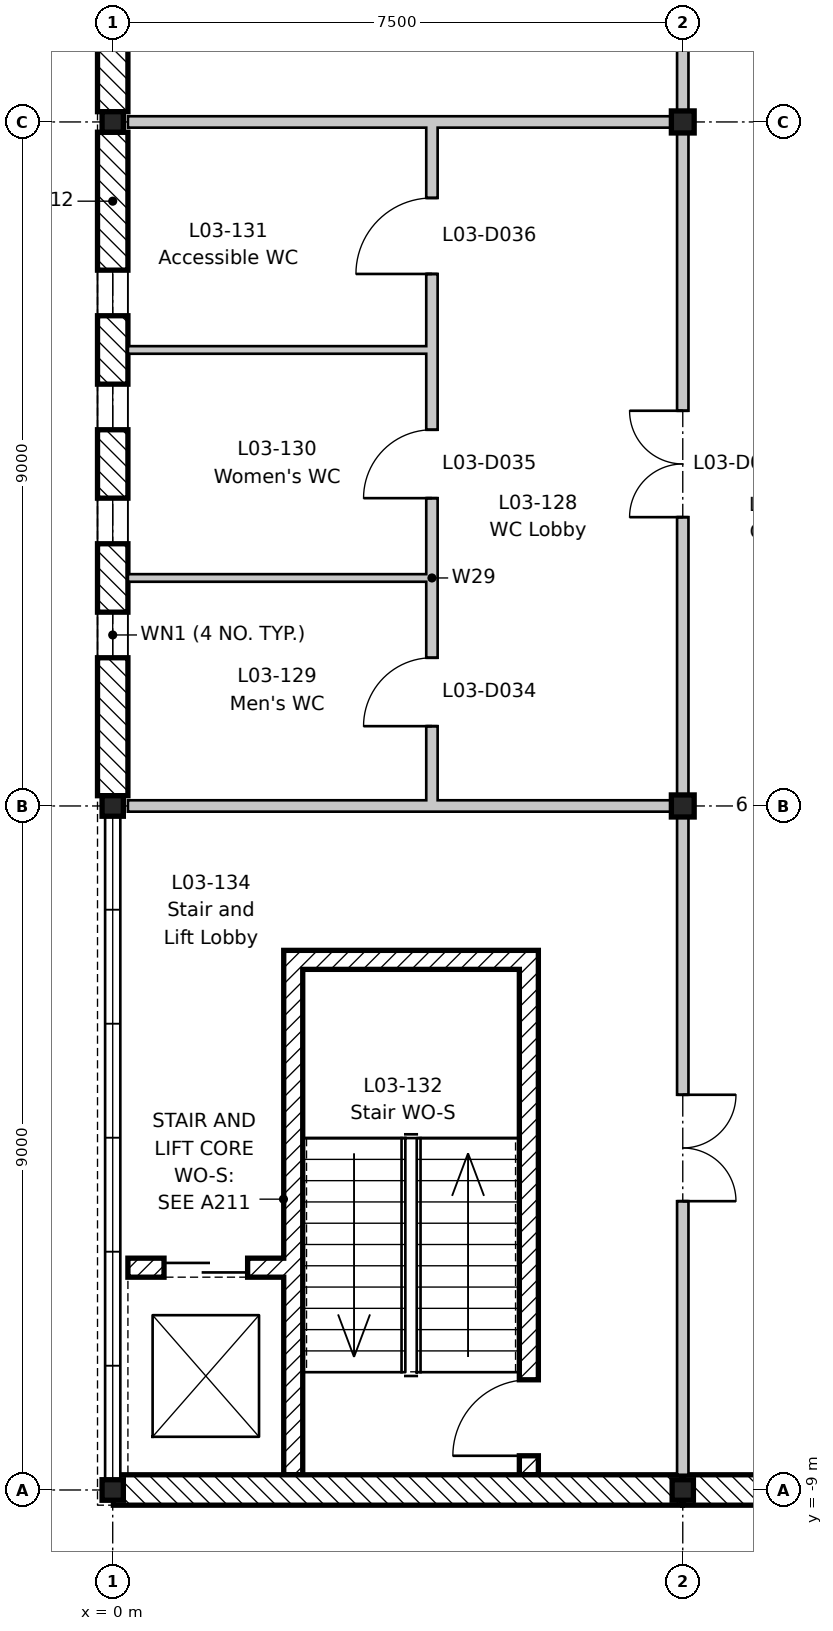
"""IFC4 building model, lengths in metres.
Left out: names, types, materials, properties, quantities, classifications, styles, units other than length and angle.
Written with IfcOpenShell. Run it as: python <this file> out.ifc"""

import sys

from ifc_helpers import new_model, si_unit, direction, frame, frame_2d, origin, origin_2d, place, context, subcontext, project, spatial, rectangle, i_section, extrude, element, fill, save


model = new_model("IFC4")
c1 = context("Model", 3, precision=1e-05, world=origin(), true_north=direction((0.0, 1.0)))
c2 = subcontext(c1, "Body", "Model", "MODEL_VIEW")
j1 = project(units=[si_unit("LENGTHUNIT", "METRE"), si_unit("PLANEANGLEUNIT", "RADIAN")], contexts=[c1])
p1 = place(None, origin())
s1 = spatial("IfcSite", under=j1, at=p1, CompositionType="ELEMENT")
p2 = place(p1, origin())
s2 = spatial("IfcBuilding", under=s1, at=p2, CompositionType="ELEMENT")
p3 = place(p2, frame((0.0, 0.0, 14.4)))
s3 = spatial("IfcBuildingStorey", under=s2, at=p3, CompositionType="ELEMENT", Elevation=14.4)
for number, where, z_axis, x_axis in (
    (1, (0.0, -9.0, -0.2), (0.0, 0.0, 1.0), (1.0, 0.0, 0.0)),
    (2, (0.0, 0.0, -0.2), (0.0, 0.0, 1.0), (1.0, 0.0, 0.0)),
    (3, (0.0, 9.0, -0.2), (0.0, 0.0, 1.0), (1.0, 0.0, 0.0)),
    (4, (7.5, -9.0, -0.2), (0.0, 0.0, 1.0), (1.0, 0.0, 0.0)),
):
    element("IfcColumn", number, at=place(p3, frame(where, z_axis=z_axis, x_axis=x_axis)), inside=s3, PredefinedType="COLUMN", context=c2, shape_type="SweptSolid", body=[
        extrude(i_section(OverallWidth=0.28, OverallDepth=0.27, WebThickness=0.008, FlangeThickness=0.013, FilletRadius=0.024, at=origin_2d()), origin(), (0.0, 0.0, 1.0), 4.2),
    ])
for number, where, z_axis, x_axis in (
    (5, (7.5, 0.0, -0.2), (0.0, 0.0, 1.0), (1.0, 0.0, 0.0)),
    (6, (7.5, 9.0, -0.2), (0.0, 0.0, 1.0), (1.0, 0.0, 0.0)),
):
    element("IfcColumn", number, at=place(p3, frame(where, z_axis=z_axis, x_axis=x_axis)), inside=s3, PredefinedType="COLUMN", context=c2, shape_type="SweptSolid", body=[
        extrude(i_section(OverallWidth=0.3, OverallDepth=0.29, WebThickness=0.009, FlangeThickness=0.014, FilletRadius=0.027, at=origin_2d()), origin(), (0.0, 0.0, 1.0), 4.2),
    ])
p4 = place(p3, frame((2.375, -8.8, 0.0), z_axis=(0.0, 0.0, 1.0), x_axis=(0.0, 1.0, 0.0)))
e7 = element("IfcWall", 7, at=p4, inside=s3, PredefinedType="SHEAR", context=c2, shape_type="SweptSolid", body=[
    extrude(rectangle(XDim=6.9, YDim=0.25, at=frame_2d((3.45, 0.0))), origin(), (0.0, 0.0, 1.0), 4.0),
])
p5 = place(p3, frame((5.475, -8.8, 0.0), z_axis=(0.0, 0.0, 1.0), x_axis=(0.0, 1.0, 0.0)))
e8 = element("IfcWall", 8, at=p5, inside=s3, PredefinedType="SHEAR", context=c2, shape_type="SweptSolid", body=[
    extrude(rectangle(XDim=6.9, YDim=0.25, at=frame_2d((3.45, 0.0))), origin(), (0.0, 0.0, 1.0), 4.0),
])
p6 = place(p5, frame((0.25, 0.0, 0.0)))
e9 = element("IfcOpeningElement", 9, at=p6, cuts=e8, PredefinedType="OPENING", context=c2, shape_type="SweptSolid", body=[
    extrude(rectangle(XDim=1.0, YDim=2.1, at=frame_2d((0.5, 1.05))), frame((0.0, 0.135, 0.0), z_axis=(0.0, -1.0, 0.0), x_axis=(1.0, 0.0, 0.0)), (0.0, 0.0, 1.0), 0.27),
])
p7 = place(p3, frame((2.5, -2.025, 0.0), z_axis=(0.0, 0.0, 1.0), x_axis=(1.0, 0.0, 0.0)))
e10 = element("IfcWall", 10, at=p7, inside=s3, PredefinedType="SHEAR", context=c2, shape_type="SweptSolid", body=[
    extrude(rectangle(XDim=2.85, YDim=0.25, at=frame_2d((1.425, 0.0))), origin(), (0.0, 0.0, 1.0), 4.0),
])
p8 = place(p3, frame((0.2, -6.075, 0.0), z_axis=(0.0, 0.0, 1.0), x_axis=(1.0, 0.0, 0.0)))
e11 = element("IfcWall", 11, at=p8, inside=s3, PredefinedType="SHEAR", context=c2, shape_type="SweptSolid", body=[
    extrude(rectangle(XDim=2.05, YDim=0.25, at=frame_2d((1.025, 0.0))), origin(), (0.0, 0.0, 1.0), 4.0),
])
p9 = place(p8, frame((0.475, 0.0, 0.0)))
e12 = element("IfcOpeningElement", 12, at=p9, cuts=e11, PredefinedType="OPENING", context=c2, shape_type="SweptSolid", body=[
    extrude(rectangle(XDim=1.1, YDim=2.1, at=frame_2d((0.55, 1.05))), frame((0.0, 0.135, 0.0), z_axis=(0.0, -1.0, 0.0), x_axis=(1.0, 0.0, 0.0)), (0.0, 0.0, 1.0), 0.27),
])
p10 = place(p3, frame((0.0, 0.135, 0.0), z_axis=(0.0, 0.0, 1.0), x_axis=(0.0, 1.0, 0.0)))
e13 = element("IfcWall", 13, at=p10, inside=s3, PredefinedType="STANDARD", context=c2, shape_type="SweptSolid", body=[
    extrude(rectangle(XDim=8.73, YDim=0.4, at=frame_2d((4.365, 0.0))), origin(), (0.0, 0.0, 1.0), 3.6),
])
p11 = place(p10, frame((1.815, 0.0, 1.5)))
e14 = element("IfcOpeningElement", 14, at=p11, cuts=e13, PredefinedType="OPENING", context=c2, shape_type="SweptSolid", body=[
    extrude(rectangle(XDim=0.6, YDim=1.2, at=frame_2d((0.3, 0.6))), frame((0.0, 0.21, 0.0), z_axis=(0.0, -1.0, 0.0), x_axis=(1.0, 0.0, 0.0)), (0.0, 0.0, 1.0), 0.42),
])
p12 = place(p10, frame((3.315, 0.0, 1.5)))
e15 = element("IfcOpeningElement", 15, at=p12, cuts=e13, PredefinedType="OPENING", context=c2, shape_type="SweptSolid", body=[
    extrude(rectangle(XDim=0.6, YDim=1.2, at=frame_2d((0.3, 0.6))), frame((0.0, 0.21, 0.0), z_axis=(0.0, -1.0, 0.0), x_axis=(1.0, 0.0, 0.0)), (0.0, 0.0, 1.0), 0.42),
])
p13 = place(p10, frame((4.815, 0.0, 1.5)))
e16 = element("IfcOpeningElement", 16, at=p13, cuts=e13, PredefinedType="OPENING", context=c2, shape_type="SweptSolid", body=[
    extrude(rectangle(XDim=0.6, YDim=1.2, at=frame_2d((0.3, 0.6))), frame((0.0, 0.21, 0.0), z_axis=(0.0, -1.0, 0.0), x_axis=(1.0, 0.0, 0.0)), (0.0, 0.0, 1.0), 0.42),
])
p14 = place(p10, frame((6.315, 0.0, 1.5)))
e17 = element("IfcOpeningElement", 17, at=p14, cuts=e13, PredefinedType="OPENING", context=c2, shape_type="SweptSolid", body=[
    extrude(rectangle(XDim=0.6, YDim=1.2, at=frame_2d((0.3, 0.6))), frame((0.0, 0.21, 0.0), z_axis=(0.0, -1.0, 0.0), x_axis=(1.0, 0.0, 0.0)), (0.0, 0.0, 1.0), 0.42),
])
p15 = place(p3, frame((0.0, 9.135, 0.0), z_axis=(0.0, 0.0, 1.0), x_axis=(0.0, 1.0, 0.0)))
e18 = element("IfcWall", 18, at=p15, inside=s3, PredefinedType="STANDARD", context=c2, shape_type="SweptSolid", body=[
    extrude(rectangle(XDim=8.73, YDim=0.4, at=frame_2d((4.365, 0.0))), origin(), (0.0, 0.0, 1.0), 3.6),
])
p16 = place(p15, frame((1.515, 0.0, 0.6)))
e19 = element("IfcOpeningElement", 19, at=p16, cuts=e18, PredefinedType="OPENING", context=c2, shape_type="SweptSolid", body=[
    extrude(rectangle(XDim=1.2, YDim=2.7, at=frame_2d((0.6, 1.35))), frame((0.0, 0.21, 0.0), z_axis=(0.0, -1.0, 0.0), x_axis=(1.0, 0.0, 0.0)), (0.0, 0.0, 1.0), 0.42),
])
p17 = place(p15, frame((3.015, 0.0, 0.6)))
e20 = element("IfcOpeningElement", 20, at=p17, cuts=e18, PredefinedType="OPENING", context=c2, shape_type="SweptSolid", body=[
    extrude(rectangle(XDim=1.2, YDim=2.7, at=frame_2d((0.6, 1.35))), frame((0.0, 0.21, 0.0), z_axis=(0.0, -1.0, 0.0), x_axis=(1.0, 0.0, 0.0)), (0.0, 0.0, 1.0), 0.42),
])
p18 = place(p15, frame((4.515, 0.0, 0.6)))
e21 = element("IfcOpeningElement", 21, at=p18, cuts=e18, PredefinedType="OPENING", context=c2, shape_type="SweptSolid", body=[
    extrude(rectangle(XDim=1.2, YDim=2.7, at=frame_2d((0.6, 1.35))), frame((0.0, 0.21, 0.0), z_axis=(0.0, -1.0, 0.0), x_axis=(1.0, 0.0, 0.0)), (0.0, 0.0, 1.0), 0.42),
])
p19 = place(p15, frame((6.015, 0.0, 0.6)))
e22 = element("IfcOpeningElement", 22, at=p19, cuts=e18, PredefinedType="OPENING", context=c2, shape_type="SweptSolid", body=[
    extrude(rectangle(XDim=1.2, YDim=2.7, at=frame_2d((0.6, 1.35))), frame((0.0, 0.21, 0.0), z_axis=(0.0, -1.0, 0.0), x_axis=(1.0, 0.0, 0.0)), (0.0, 0.0, 1.0), 0.42),
])
p20 = place(p3, frame((7.491, -9.0, 0.0), z_axis=(0.0, 0.0, 1.0), x_axis=(-1.0, 0.0, 0.0)))
e23 = element("IfcWall", 23, at=p20, inside=s3, PredefinedType="STANDARD", context=c2, shape_type="SweptSolid", body=[
    extrude(rectangle(XDim=7.482, YDim=0.4, at=frame_2d((3.741, 0.0))), origin(), (0.0, 0.0, 1.0), 3.67),
])
p21 = place(p3, frame((10.491, -9.0, 0.0), z_axis=(0.0, 0.0, 1.0), x_axis=(-1.0, 0.0, 0.0)))
e24 = element("IfcWall", 24, at=p21, inside=s3, PredefinedType="STANDARD", context=c2, shape_type="SweptSolid", body=[
    extrude(rectangle(XDim=2.982, YDim=0.4, at=frame_2d((1.491, 0.0))), origin(), (0.0, 0.0, 1.0), 3.8),
])
for number, where, z_axis, x_axis in (
    (25, (0.2, 9.0, 0.0), (0.0, 0.0, 1.0), (1.0, 0.0, 0.0)),
    (26, (0.2, 0.0, 0.0), (0.0, 0.0, 1.0), (1.0, 0.0, 0.0)),
):
    element("IfcWall", number, at=place(p3, frame(where, z_axis=z_axis, x_axis=x_axis)), inside=s3, PredefinedType="PARTITIONING", context=c2, shape_type="SweptSolid", body=[
        extrude(rectangle(XDim=7.225, YDim=0.15, at=frame_2d((3.613, 0.0))), origin(), (0.0, 0.0, 1.0), 3.65),
    ])
p22 = place(p3, frame((7.5, -8.8, 0.0), z_axis=(0.0, 0.0, 1.0), x_axis=(0.0, 1.0, 0.0)))
e27 = element("IfcWall", 27, at=p22, inside=s3, PredefinedType="PARTITIONING", context=c2, shape_type="SweptSolid", body=[
    extrude(rectangle(XDim=79.3, YDim=0.15, at=frame_2d((39.65, 0.0))), origin(), (0.0, 0.0, 1.0), 3.48),
])
p23 = place(p22, frame((18.8, 0.0, 0.0)))
e28 = element("IfcOpeningElement", 28, at=p23, cuts=e27, PredefinedType="OPENING", context=c2, shape_type="SweptSolid", body=[
    extrude(rectangle(XDim=1.0, YDim=2.1, at=frame_2d((0.5, 1.05))), frame((0.0, 0.085, 0.0), z_axis=(0.0, -1.0, 0.0), x_axis=(1.0, 0.0, 0.0)), (0.0, 0.0, 1.0), 0.17),
])
p24 = place(p22, frame((23.3, 0.0, 0.0)))
e29 = element("IfcOpeningElement", 29, at=p24, cuts=e27, PredefinedType="OPENING", context=c2, shape_type="SweptSolid", body=[
    extrude(rectangle(XDim=1.0, YDim=2.1, at=frame_2d((0.5, 1.05))), frame((0.0, 0.085, 0.0), z_axis=(0.0, -1.0, 0.0), x_axis=(1.0, 0.0, 0.0)), (0.0, 0.0, 1.0), 0.17),
])
p25 = place(p22, frame((27.8, 0.0, 0.0)))
e30 = element("IfcOpeningElement", 30, at=p25, cuts=e27, PredefinedType="OPENING", context=c2, shape_type="SweptSolid", body=[
    extrude(rectangle(XDim=1.0, YDim=2.1, at=frame_2d((0.5, 1.05))), frame((0.0, 0.085, 0.0), z_axis=(0.0, -1.0, 0.0), x_axis=(1.0, 0.0, 0.0)), (0.0, 0.0, 1.0), 0.17),
])
p26 = place(p22, frame((30.8, 0.0, 0.0)))
e31 = element("IfcOpeningElement", 31, at=p26, cuts=e27, PredefinedType="OPENING", context=c2, shape_type="SweptSolid", body=[
    extrude(rectangle(XDim=1.0, YDim=2.1, at=frame_2d((0.5, 1.05))), frame((0.0, 0.085, 0.0), z_axis=(0.0, -1.0, 0.0), x_axis=(1.0, 0.0, 0.0)), (0.0, 0.0, 1.0), 0.17),
])
p27 = place(p22, frame((33.8, 0.0, 0.0)))
e32 = element("IfcOpeningElement", 32, at=p27, cuts=e27, PredefinedType="OPENING", context=c2, shape_type="SweptSolid", body=[
    extrude(rectangle(XDim=1.0, YDim=2.1, at=frame_2d((0.5, 1.05))), frame((0.0, 0.085, 0.0), z_axis=(0.0, -1.0, 0.0), x_axis=(1.0, 0.0, 0.0)), (0.0, 0.0, 1.0), 0.17),
])
p28 = place(p22, frame((47.3, 0.0, 0.0)))
e33 = element("IfcOpeningElement", 33, at=p28, cuts=e27, PredefinedType="OPENING", context=c2, shape_type="SweptSolid", body=[
    extrude(rectangle(XDim=1.0, YDim=2.1, at=frame_2d((0.5, 1.05))), frame((0.0, 0.085, 0.0), z_axis=(0.0, -1.0, 0.0), x_axis=(1.0, 0.0, 0.0)), (0.0, 0.0, 1.0), 0.17),
])
p29 = place(p22, frame((51.8, 0.0, 0.0)))
e34 = element("IfcOpeningElement", 34, at=p29, cuts=e27, PredefinedType="OPENING", context=c2, shape_type="SweptSolid", body=[
    extrude(rectangle(XDim=1.0, YDim=2.1, at=frame_2d((0.5, 1.05))), frame((0.0, 0.085, 0.0), z_axis=(0.0, -1.0, 0.0), x_axis=(1.0, 0.0, 0.0)), (0.0, 0.0, 1.0), 0.17),
])
p30 = place(p22, frame((54.8, 0.0, 0.0)))
e35 = element("IfcOpeningElement", 35, at=p30, cuts=e27, PredefinedType="OPENING", context=c2, shape_type="SweptSolid", body=[
    extrude(rectangle(XDim=1.0, YDim=2.1, at=frame_2d((0.5, 1.05))), frame((0.0, 0.085, 0.0), z_axis=(0.0, -1.0, 0.0), x_axis=(1.0, 0.0, 0.0)), (0.0, 0.0, 1.0), 0.17),
])
p31 = place(p22, frame((57.8, 0.0, 0.0)))
e36 = element("IfcOpeningElement", 36, at=p31, cuts=e27, PredefinedType="OPENING", context=c2, shape_type="SweptSolid", body=[
    extrude(rectangle(XDim=1.0, YDim=2.1, at=frame_2d((0.5, 1.05))), frame((0.0, 0.085, 0.0), z_axis=(0.0, -1.0, 0.0), x_axis=(1.0, 0.0, 0.0)), (0.0, 0.0, 1.0), 0.17),
])
p32 = place(p22, frame((60.8, 0.0, 0.0)))
e37 = element("IfcOpeningElement", 37, at=p32, cuts=e27, PredefinedType="OPENING", context=c2, shape_type="SweptSolid", body=[
    extrude(rectangle(XDim=1.0, YDim=2.1, at=frame_2d((0.5, 1.05))), frame((0.0, 0.085, 0.0), z_axis=(0.0, -1.0, 0.0), x_axis=(1.0, 0.0, 0.0)), (0.0, 0.0, 1.0), 0.17),
])
p33 = place(p22, frame((12.6, 0.0, 0.0)))
e38 = element("IfcOpeningElement", 38, at=p33, cuts=e27, PredefinedType="OPENING", context=c2, shape_type="SweptSolid", body=[
    extrude(rectangle(XDim=1.4, YDim=2.1, at=frame_2d((0.7, 1.05))), frame((0.0, 0.085, 0.0), z_axis=(0.0, -1.0, 0.0), x_axis=(1.0, 0.0, 0.0)), (0.0, 0.0, 1.0), 0.17),
])
p34 = place(p22, frame((3.6, 0.0, 0.0)))
e39 = element("IfcOpeningElement", 39, at=p34, cuts=e27, PredefinedType="OPENING", context=c2, shape_type="SweptSolid", body=[
    extrude(rectangle(XDim=1.4, YDim=2.1, at=frame_2d((0.7, 1.05))), frame((0.0, 0.085, 0.0), z_axis=(0.0, -1.0, 0.0), x_axis=(1.0, 0.0, 0.0)), (0.0, 0.0, 1.0), 0.17),
])
p35 = place(p22, frame((63.55, 0.0, 0.0)))
e40 = element("IfcOpeningElement", 40, at=p35, cuts=e27, PredefinedType="OPENING", context=c2, shape_type="SweptSolid", body=[
    extrude(rectangle(XDim=1.4, YDim=2.1, at=frame_2d((0.7, 1.05))), frame((0.0, 0.085, 0.0), z_axis=(0.0, -1.0, 0.0), x_axis=(1.0, 0.0, 0.0)), (0.0, 0.0, 1.0), 0.17),
])
p36 = place(p22, frame((69.6, 0.0, 0.0)))
e41 = element("IfcOpeningElement", 41, at=p36, cuts=e27, PredefinedType="OPENING", context=c2, shape_type="SweptSolid", body=[
    extrude(rectangle(XDim=1.4, YDim=2.1, at=frame_2d((0.7, 1.05))), frame((0.0, 0.085, 0.0), z_axis=(0.0, -1.0, 0.0), x_axis=(1.0, 0.0, 0.0)), (0.0, 0.0, 1.0), 0.17),
])
p37 = place(p22, frame((42.85, 0.0, 0.0)))
e42 = element("IfcOpeningElement", 42, at=p37, cuts=e27, PredefinedType="OPENING", context=c2, shape_type="SweptSolid", body=[
    extrude(rectangle(XDim=1.0, YDim=2.1, at=frame_2d((0.5, 1.05))), frame((0.0, 0.085, 0.0), z_axis=(0.0, -1.0, 0.0), x_axis=(1.0, 0.0, 0.0)), (0.0, 0.0, 1.0), 0.17),
])
p38 = place(p22, frame((36.55, 0.0, 0.0)))
e43 = element("IfcOpeningElement", 43, at=p38, cuts=e27, PredefinedType="OPENING", context=c2, shape_type="SweptSolid", body=[
    extrude(rectangle(XDim=1.4, YDim=2.1, at=frame_2d((0.7, 1.05))), frame((0.0, 0.085, 0.0), z_axis=(0.0, -1.0, 0.0), x_axis=(1.0, 0.0, 0.0)), (0.0, 0.0, 1.0), 0.17),
])
p39 = place(p22, frame((72.8, 0.0, 0.0)))
e44 = element("IfcOpeningElement", 44, at=p39, cuts=e27, PredefinedType="OPENING", context=c2, shape_type="SweptSolid", body=[
    extrude(rectangle(XDim=1.0, YDim=2.1, at=frame_2d((0.5, 1.05))), frame((0.0, 0.085, 0.0), z_axis=(0.0, -1.0, 0.0), x_axis=(1.0, 0.0, 0.0)), (0.0, 0.0, 1.0), 0.17),
])
p40 = place(p3, frame((4.2, 0.075, 0.0), z_axis=(0.0, 0.0, 1.0), x_axis=(0.0, 1.0, 0.0)))
e45 = element("IfcWall", 45, at=p40, inside=s3, PredefinedType="PARTITIONING", context=c2, shape_type="SweptSolid", body=[
    extrude(rectangle(XDim=8.85, YDim=0.15, at=frame_2d((4.425, 0.0))), origin(), (0.0, 0.0, 1.0), 4.0),
])
p41 = place(p40, frame((0.975, 0.0, 0.0)))
e46 = element("IfcOpeningElement", 46, at=p41, cuts=e45, PredefinedType="OPENING", context=c2, shape_type="SweptSolid", body=[
    extrude(rectangle(XDim=0.9, YDim=2.1, at=frame_2d((0.45, 1.05))), frame((0.0, 0.085, 0.0), z_axis=(0.0, -1.0, 0.0), x_axis=(1.0, 0.0, 0.0)), (0.0, 0.0, 1.0), 0.17),
])
p42 = place(p40, frame((3.975, 0.0, 0.0)))
e47 = element("IfcOpeningElement", 47, at=p42, cuts=e45, PredefinedType="OPENING", context=c2, shape_type="SweptSolid", body=[
    extrude(rectangle(XDim=0.9, YDim=2.1, at=frame_2d((0.45, 1.05))), frame((0.0, 0.085, 0.0), z_axis=(0.0, -1.0, 0.0), x_axis=(1.0, 0.0, 0.0)), (0.0, 0.0, 1.0), 0.17),
])
p43 = place(p40, frame((6.925, 0.0, 0.0)))
e48 = element("IfcOpeningElement", 48, at=p43, cuts=e45, PredefinedType="OPENING", context=c2, shape_type="SweptSolid", body=[
    extrude(rectangle(XDim=1.0, YDim=2.1, at=frame_2d((0.5, 1.05))), frame((0.0, 0.085, 0.0), z_axis=(0.0, -1.0, 0.0), x_axis=(1.0, 0.0, 0.0)), (0.0, 0.0, 1.0), 0.17),
])
for number, where, z_axis, x_axis in (
    (49, (0.2, 3.0, 0.0), (0.0, 0.0, 1.0), (1.0, 0.0, 0.0)),
    (50, (0.2, 6.0, 0.0), (0.0, 0.0, 1.0), (1.0, 0.0, 0.0)),
):
    element("IfcWall", number, at=place(p3, frame(where, z_axis=z_axis, x_axis=x_axis)), inside=s3, PredefinedType="PARTITIONING", context=c2, shape_type="SweptSolid", body=[
        extrude(rectangle(XDim=3.925, YDim=0.1, at=frame_2d((1.962, 0.0))), origin(), (0.0, 0.0, 1.0), 4.0),
    ])
p44 = place(p11, origin())
e51 = element("IfcWindow", 51, at=p44, inside=s3, PartitioningType="SINGLE_PANEL", PredefinedType="WINDOW", context=c2, shape_type="SweptSolid", body=[
    extrude(rectangle(XDim=0.6, YDim=1.2, at=frame_2d((0.3, 0.6))), frame((0.0, 0.03, 0.0), z_axis=(0.0, -1.0, 0.0), x_axis=(1.0, 0.0, 0.0)), (0.0, 0.0, 1.0), 0.06),
])
fill(e14, e51)
p45 = place(p12, origin())
e52 = element("IfcWindow", 52, at=p45, inside=s3, PartitioningType="SINGLE_PANEL", PredefinedType="WINDOW", context=c2, shape_type="SweptSolid", body=[
    extrude(rectangle(XDim=0.6, YDim=1.2, at=frame_2d((0.3, 0.6))), frame((0.0, 0.03, 0.0), z_axis=(0.0, -1.0, 0.0), x_axis=(1.0, 0.0, 0.0)), (0.0, 0.0, 1.0), 0.06),
])
fill(e15, e52)
p46 = place(p13, origin())
e53 = element("IfcWindow", 53, at=p46, inside=s3, PartitioningType="SINGLE_PANEL", PredefinedType="WINDOW", context=c2, shape_type="SweptSolid", body=[
    extrude(rectangle(XDim=0.6, YDim=1.2, at=frame_2d((0.3, 0.6))), frame((0.0, 0.03, 0.0), z_axis=(0.0, -1.0, 0.0), x_axis=(1.0, 0.0, 0.0)), (0.0, 0.0, 1.0), 0.06),
])
fill(e16, e53)
p47 = place(p14, origin())
e54 = element("IfcWindow", 54, at=p47, inside=s3, PartitioningType="SINGLE_PANEL", PredefinedType="WINDOW", context=c2, shape_type="SweptSolid", body=[
    extrude(rectangle(XDim=0.6, YDim=1.2, at=frame_2d((0.3, 0.6))), frame((0.0, 0.03, 0.0), z_axis=(0.0, -1.0, 0.0), x_axis=(1.0, 0.0, 0.0)), (0.0, 0.0, 1.0), 0.06),
])
fill(e17, e54)
p48 = place(p33, origin())
e55 = element("IfcDoor", 55, at=p48, inside=s3, OperationType="DOUBLE_DOOR_SINGLE_SWING", PredefinedType="DOOR", context=c2, shape_type="SweptSolid", body=[
    extrude(rectangle(XDim=1.4, YDim=2.1, at=frame_2d((0.7, 1.05))), frame((0.0, 0.025, 0.0), z_axis=(0.0, -1.0, 0.0), x_axis=(1.0, 0.0, 0.0)), (0.0, 0.0, 1.0), 0.05),
])
fill(e38, e55)
p49 = place(p41, origin())
e56 = element("IfcDoor", 56, at=p49, inside=s3, OperationType="SINGLE_SWING_LEFT", PredefinedType="DOOR", context=c2, shape_type="SweptSolid", body=[
    extrude(rectangle(XDim=0.9, YDim=2.1, at=frame_2d((0.45, 1.05))), frame((0.0, 0.025, 0.0), z_axis=(0.0, -1.0, 0.0), x_axis=(1.0, 0.0, 0.0)), (0.0, 0.0, 1.0), 0.05),
])
fill(e46, e56)
p50 = place(p42, origin())
e57 = element("IfcDoor", 57, at=p50, inside=s3, OperationType="SINGLE_SWING_LEFT", PredefinedType="DOOR", context=c2, shape_type="SweptSolid", body=[
    extrude(rectangle(XDim=0.9, YDim=2.1, at=frame_2d((0.45, 1.05))), frame((0.0, 0.025, 0.0), z_axis=(0.0, -1.0, 0.0), x_axis=(1.0, 0.0, 0.0)), (0.0, 0.0, 1.0), 0.05),
])
fill(e47, e57)
p51 = place(p43, origin())
e58 = element("IfcDoor", 58, at=p51, inside=s3, OperationType="SINGLE_SWING_LEFT", PredefinedType="DOOR", context=c2, shape_type="SweptSolid", body=[
    extrude(rectangle(XDim=1.0, YDim=2.1, at=frame_2d((0.5, 1.05))), frame((0.0, 0.025, 0.0), z_axis=(0.0, -1.0, 0.0), x_axis=(1.0, 0.0, 0.0)), (0.0, 0.0, 1.0), 0.05),
])
fill(e48, e58)
p52 = place(p6, origin())
e59 = element("IfcDoor", 59, at=p52, inside=s3, OperationType="SINGLE_SWING_LEFT", PredefinedType="DOOR", context=c2, shape_type="SweptSolid", body=[
    extrude(rectangle(XDim=1.0, YDim=2.1, at=frame_2d((0.5, 1.05))), frame((0.0, 0.025, 0.0), z_axis=(0.0, -1.0, 0.0), x_axis=(1.0, 0.0, 0.0)), (0.0, 0.0, 1.0), 0.05),
])
fill(e9, e59)
p53 = place(p34, frame((1.4, 0.0, 0.0), z_axis=(0.0, 0.0, 1.0), x_axis=(-1.0, 0.0, 0.0)))
e60 = element("IfcDoor", 60, at=p53, inside=s3, OperationType="DOUBLE_DOOR_SINGLE_SWING", PredefinedType="DOOR", context=c2, shape_type="SweptSolid", body=[
    extrude(rectangle(XDim=1.4, YDim=2.1, at=frame_2d((0.7, 1.05))), frame((0.0, 0.025, 0.0), z_axis=(0.0, -1.0, 0.0), x_axis=(1.0, 0.0, 0.0)), (0.0, 0.0, 1.0), 0.05),
])
fill(e39, e60)
p54 = place(p9, origin())
e61 = element("IfcDoor", 61, at=p54, inside=s3, OperationType="SLIDING_TO_LEFT", PredefinedType="DOOR", context=c2, shape_type="SweptSolid", body=[
    extrude(rectangle(XDim=1.1, YDim=2.1, at=frame_2d((0.55, 1.05))), frame((0.0, 0.025, 0.0), z_axis=(0.0, -1.0, 0.0), x_axis=(1.0, 0.0, 0.0)), (0.0, 0.0, 1.0), 0.05),
])
fill(e12, e61)
save(model, sys.argv[1])
